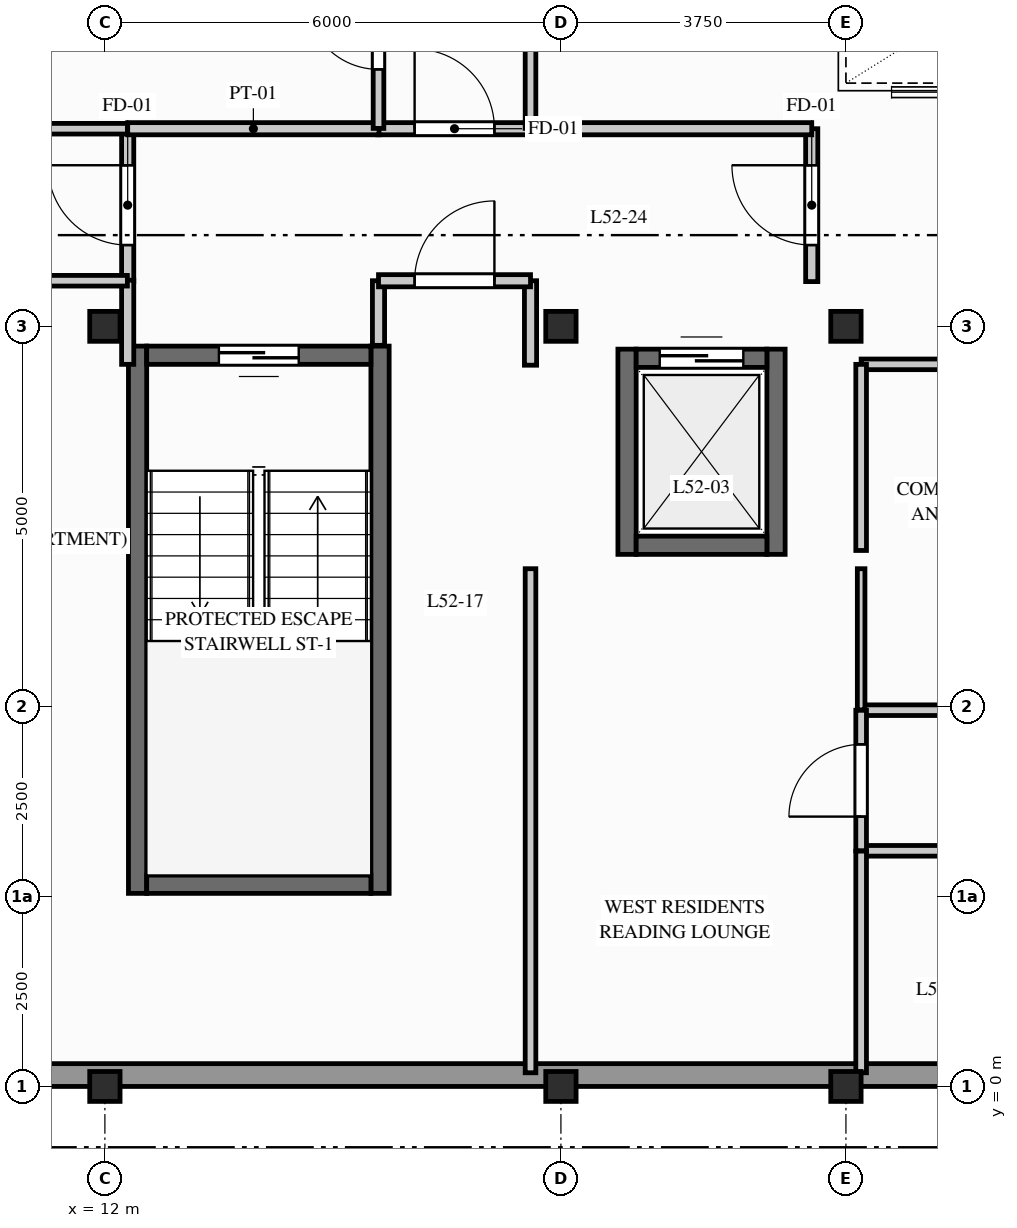
"""IFC4 building model, lengths in metres.
Left out: names, types, materials, properties, quantities, classifications, styles, units other than length and angle.
Written with IfcOpenShell. Run it as: python <this file> out.ifc"""

import sys

from ifc_helpers import new_model, si_unit, direction, frame, frame_2d, origin, origin_2d, place, context, subcontext, project, spatial, rectangle, i_section, extrude, element, fill, save


model = new_model("IFC4")
c1 = context("Model", 3, precision=1e-05, world=origin(), true_north=direction((0.0, 1.0)))
c2 = subcontext(c1, "Body", "Model", "MODEL_VIEW")
j1 = project(units=[si_unit("LENGTHUNIT", "METRE"), si_unit("PLANEANGLEUNIT", "RADIAN")], contexts=[c1])
p1 = place(None, origin())
s1 = spatial("IfcSite", under=j1, at=p1, CompositionType="ELEMENT")
p2 = place(p1, origin())
s2 = spatial("IfcBuilding", under=s1, at=p2, CompositionType="ELEMENT")
p3 = place(p2, frame((0.0, 0.0, 172.8)))
s3 = spatial("IfcBuildingStorey", under=s2, at=p3, CompositionType="ELEMENT", Elevation=172.8)
for number, where, z_axis, x_axis in (
    (1, (12.0, 0.0, 0.0), (0.0, 0.0, 1.0), (1.0, 0.0, 0.0)),
    (2, (12.0, 10.0, 0.0), (0.0, 0.0, 1.0), (1.0, 0.0, 0.0)),
    (3, (18.0, 0.0, 0.0), (0.0, 0.0, 1.0), (1.0, 0.0, 0.0)),
    (4, (18.0, 10.0, 0.0), (0.0, 0.0, 1.0), (1.0, 0.0, 0.0)),
    (5, (21.75, 0.0, 0.0), (0.0, 0.0, 1.0), (1.0, 0.0, 0.0)),
    (6, (21.75, 10.0, 0.0), (0.0, 0.0, 1.0), (1.0, 0.0, 0.0)),
):
    element("IfcColumn", number, at=place(p3, frame(where, z_axis=z_axis, x_axis=x_axis)), inside=s3, PredefinedType="COLUMN", context=c2, shape_type="SweptSolid", body=[
        extrude(i_section(OverallWidth=0.399, OverallDepth=0.394, WebThickness=0.023, FlangeThickness=0.037, FilletRadius=0.015, at=origin_2d()), origin(), (0.0, 0.0, 1.0), 3.1),
    ])
p4 = place(p3, frame((2.5, 0.15, 0.0), z_axis=(0.0, 0.0, 1.0), x_axis=(1.0, 0.0, 0.0)))
e7 = element("IfcWall", 7, at=p4, inside=s3, PredefinedType="STANDARD", context=c2, shape_type="SweptSolid", body=[
    extrude(rectangle(XDim=55.0, YDim=0.3, at=frame_2d((27.5, 0.0))), origin(), (0.0, 0.0, 1.0), 2.332),
])
p5 = place(p4, frame((1.0, 0.0, 0.312)))
e8 = element("IfcOpeningElement", 8, at=p5, cuts=e7, PredefinedType="OPENING", context=c2, shape_type="SweptSolid", body=[
    extrude(rectangle(XDim=1.5, YDim=1.8, at=frame_2d((0.75, 0.9))), frame((0.0, 0.16, 0.0), z_axis=(0.0, -1.0, 0.0), x_axis=(1.0, 0.0, 0.0)), (0.0, 0.0, 1.0), 0.32),
])
p6 = place(p4, frame((24.5, 0.0, 1.15)))
e9 = element("IfcOpeningElement", 9, at=p6, cuts=e7, PredefinedType="OPENING", context=c2, shape_type="SweptSolid", body=[
    extrude(rectangle(XDim=0.9, YDim=0.9, at=frame_2d((0.45, 0.45))), frame((0.0, 0.16, 0.0), z_axis=(0.0, -1.0, 0.0), x_axis=(1.0, 0.0, 0.0)), (0.0, 0.0, 1.0), 0.32),
])
p7 = place(p4, frame((47.2, 0.0, 0.512)))
e10 = element("IfcOpeningElement", 10, at=p7, cuts=e7, PredefinedType="OPENING", context=c2, shape_type="SweptSolid", body=[
    extrude(rectangle(XDim=1.2, YDim=1.6, at=frame_2d((0.6, 0.8))), frame((0.0, 0.16, 0.0), z_axis=(0.0, -1.0, 0.0), x_axis=(1.0, 0.0, 0.0)), (0.0, 0.0, 1.0), 0.32),
])
p8 = place(p4, frame((52.3, 0.0, 0.512)))
e11 = element("IfcOpeningElement", 11, at=p8, cuts=e7, PredefinedType="OPENING", context=c2, shape_type="SweptSolid", body=[
    extrude(rectangle(XDim=1.2, YDim=1.6, at=frame_2d((0.6, 0.8))), frame((0.0, 0.16, 0.0), z_axis=(0.0, -1.0, 0.0), x_axis=(1.0, 0.0, 0.0)), (0.0, 0.0, 1.0), 0.32),
])
p9 = place(p4, frame((4.988, 0.0, 0.512)))
e12 = element("IfcOpeningElement", 12, at=p9, cuts=e7, PredefinedType="OPENING", context=c2, shape_type="SweptSolid", body=[
    extrude(rectangle(XDim=1.2, YDim=1.6, at=frame_2d((0.6, 0.8))), frame((0.0, 0.16, 0.0), z_axis=(0.0, -1.0, 0.0), x_axis=(1.0, 0.0, 0.0)), (0.0, 0.0, 1.0), 0.32),
])
for number, where, z_axis, x_axis in (
    (13, (12.43, 2.54, 0.0), (0.0, 0.0, 1.0), (0.0, 1.0, 0.0)),
    (14, (15.62, 2.54, 0.0), (0.0, 0.0, 1.0), (0.0, 1.0, 0.0)),
):
    element("IfcWall", number, at=place(p3, frame(where, z_axis=z_axis, x_axis=x_axis)), inside=s3, PredefinedType="SHEAR", context=c2, shape_type="SweptSolid", body=[
        extrude(rectangle(XDim=7.2, YDim=0.24, at=frame_2d((3.6, 0.0))), origin(), (0.0, 0.0, 1.0), 2.89),
    ])
p10 = place(p3, frame((12.55, 2.66, 0.0), z_axis=(0.0, 0.0, 1.0), x_axis=(1.0, 0.0, 0.0)))
e15 = element("IfcWall", 15, at=p10, inside=s3, PredefinedType="SHEAR", context=c2, shape_type="SweptSolid", body=[
    extrude(rectangle(XDim=2.95, YDim=0.24, at=frame_2d((1.475, 0.0))), origin(), (0.0, 0.0, 1.0), 2.89),
])
p11 = place(p3, frame((15.5, 9.62, 0.0), z_axis=(0.0, 0.0, 1.0), x_axis=(-1.0, 0.0, 0.0)))
e16 = element("IfcWall", 16, at=p11, inside=s3, PredefinedType="SHEAR", context=c2, shape_type="SweptSolid", body=[
    extrude(rectangle(XDim=2.95, YDim=0.24, at=frame_2d((1.475, 0.0))), origin(), (0.0, 0.0, 1.0), 2.89),
])
p12 = place(p11, frame((0.95, 0.0, 0.0)))
e17 = element("IfcOpeningElement", 17, at=p12, cuts=e16, PredefinedType="OPENING", context=c2, shape_type="SweptSolid", body=[
    extrude(rectangle(XDim=1.05, YDim=2.06, at=frame_2d((0.525, 1.03))), frame((0.0, 0.13, 0.0), z_axis=(0.0, -1.0, 0.0), x_axis=(1.0, 0.0, 0.0)), (0.0, 0.0, 1.0), 0.26),
])
for number, where, z_axis, x_axis in (
    (18, (18.87, 7.0, 0.0), (0.0, 0.0, 1.0), (0.0, 1.0, 0.0)),
    (19, (20.83, 7.0, 0.0), (0.0, 0.0, 1.0), (0.0, 1.0, 0.0)),
):
    element("IfcWall", number, at=place(p3, frame(where, z_axis=z_axis, x_axis=x_axis)), inside=s3, PredefinedType="SHEAR", context=c2, shape_type="SweptSolid", body=[
        extrude(rectangle(XDim=2.7, YDim=0.24, at=frame_2d((1.35, 0.0))), origin(), (0.0, 0.0, 1.0), 2.89),
    ])
p13 = place(p3, frame((18.99, 7.12, 0.0), z_axis=(0.0, 0.0, 1.0), x_axis=(1.0, 0.0, 0.0)))
e20 = element("IfcWall", 20, at=p13, inside=s3, PredefinedType="SHEAR", context=c2, shape_type="SweptSolid", body=[
    extrude(rectangle(XDim=1.72, YDim=0.24, at=frame_2d((0.86, 0.0))), origin(), (0.0, 0.0, 1.0), 2.89),
])
p14 = place(p3, frame((18.99, 9.58, 0.0), z_axis=(0.0, 0.0, 1.0), x_axis=(1.0, 0.0, 0.0)))
e21 = element("IfcWall", 21, at=p14, inside=s3, PredefinedType="SHEAR", context=c2, shape_type="SweptSolid", body=[
    extrude(rectangle(XDim=1.72, YDim=0.24, at=frame_2d((0.86, 0.0))), origin(), (0.0, 0.0, 1.0), 2.89),
])
p15 = place(p14, frame((0.31, 0.0, 0.0)))
e22 = element("IfcOpeningElement", 22, at=p15, cuts=e21, PredefinedType="OPENING", context=c2, shape_type="SweptSolid", body=[
    extrude(rectangle(XDim=1.1, YDim=2.06, at=frame_2d((0.55, 1.03))), frame((0.0, 0.13, 0.0), z_axis=(0.0, -1.0, 0.0), x_axis=(1.0, 0.0, 0.0)), (0.0, 0.0, 1.0), 0.26),
])
p16 = place(p3, frame((21.95, 3.1, 0.0), z_axis=(0.0, 0.0, 1.0), x_axis=(1.0, 0.0, 0.0)))
e23 = element("IfcWall", 23, at=p16, inside=s3, PredefinedType="PARTITIONING", context=c2, shape_type="SweptSolid", body=[
    extrude(rectangle(XDim=3.781, YDim=0.14, at=frame_2d((1.891, 0.0))), origin(), (0.0, 0.0, 1.0), 2.89),
])
p17 = place(p16, frame((1.366, 0.0, 0.0)))
e24 = element("IfcOpeningElement", 24, at=p17, cuts=e23, PredefinedType="OPENING", context=c2, shape_type="SweptSolid", body=[
    extrude(rectangle(XDim=1.05, YDim=2.06, at=frame_2d((0.525, 1.03))), frame((0.0, 0.08, 0.0), z_axis=(0.0, -1.0, 0.0), x_axis=(1.0, 0.0, 0.0)), (0.0, 0.0, 1.0), 0.16),
])
p18 = place(p3, frame((21.95, 4.95, 0.0), z_axis=(0.0, 0.0, 1.0), x_axis=(1.0, 0.0, 0.0)))
e25 = element("IfcWall", 25, at=p18, inside=s3, PredefinedType="PARTITIONING", context=c2, shape_type="SweptSolid", body=[
    extrude(rectangle(XDim=5.231, YDim=0.14, at=frame_2d((2.616, 0.0))), origin(), (0.0, 0.0, 1.0), 2.89),
])
p19 = place(p18, frame((2.141, 0.0, 0.0)))
e26 = element("IfcOpeningElement", 26, at=p19, cuts=e25, PredefinedType="OPENING", context=c2, shape_type="SweptSolid", body=[
    extrude(rectangle(XDim=0.95, YDim=2.05, at=frame_2d((0.475, 1.025))), frame((0.0, 0.08, 0.0), z_axis=(0.0, -1.0, 0.0), x_axis=(1.0, 0.0, 0.0)), (0.0, 0.0, 1.0), 0.16),
])
p20 = place(p3, frame((21.95, 3.1, 0.0), z_axis=(0.0, 0.0, 1.0), x_axis=(0.0, 1.0, 0.0)))
e27 = element("IfcWall", 27, at=p20, inside=s3, PredefinedType="PARTITIONING", context=c2, shape_type="SweptSolid", body=[
    extrude(rectangle(XDim=1.85, YDim=0.14, at=frame_2d((0.925, 0.0))), origin(), (0.0, 0.0, 1.0), 2.253),
])
p21 = place(p20, frame((0.45, 0.0, 0.0)))
e28 = element("IfcOpeningElement", 28, at=p21, cuts=e27, PredefinedType="OPENING", context=c2, shape_type="SweptSolid", body=[
    extrude(rectangle(XDim=0.95, YDim=2.05, at=frame_2d((0.475, 1.025))), frame((0.0, 0.08, 0.0), z_axis=(0.0, -1.0, 0.0), x_axis=(1.0, 0.0, 0.0)), (0.0, 0.0, 1.0), 0.16),
])
p22 = place(p3, frame((21.95, 0.18, 0.0), z_axis=(0.0, 0.0, 1.0), x_axis=(0.0, 1.0, 0.0)))
e29 = element("IfcWall", 29, at=p22, inside=s3, PredefinedType="PARTITIONING", context=c2, shape_type="SweptSolid", body=[
    extrude(rectangle(XDim=2.916, YDim=0.14, at=frame_2d((1.458, 0.0))), origin(), (0.0, 0.0, 1.0), 2.253),
])
p23 = place(p3, frame((21.95, 4.954, 0.0), z_axis=(0.0, 0.0, 1.0), x_axis=(0.0, 1.0, 0.0)))
e30 = element("IfcWall", 30, at=p23, inside=s3, PredefinedType="PARTITIONING", context=c2, shape_type="SweptSolid", body=[
    extrude(rectangle(XDim=1.857, YDim=0.1, at=frame_2d((0.929, 0.0))), origin(), (0.0, 0.0, 1.0), 2.253),
])
p24 = place(p3, frame((17.6, 0.18, 0.0), z_axis=(0.0, 0.0, 1.0), x_axis=(0.0, 1.0, 0.0)))
e31 = element("IfcWall", 31, at=p24, inside=s3, PredefinedType="PARTITIONING", context=c2, shape_type="SweptSolid", body=[
    extrude(rectangle(XDim=6.631, YDim=0.14, at=frame_2d((3.316, 0.0))), origin(), (0.0, 0.0, 1.0), 2.89),
])
p25 = place(p3, frame((15.6, 9.75, 0.0), z_axis=(0.0, 0.0, 1.0), x_axis=(0.0, 1.0, 0.0)))
e32 = element("IfcWall", 32, at=p25, inside=s3, PredefinedType="PARTITIONING", context=c2, shape_type="SweptSolid", body=[
    extrude(rectangle(XDim=0.85, YDim=0.16, at=frame_2d((0.425, 0.0))), origin(), (0.0, 0.0, 1.0), 2.253),
])
p26 = place(p3, frame((17.6, 9.489, 0.0), z_axis=(0.0, 0.0, 1.0), x_axis=(0.0, 1.0, 0.0)))
e33 = element("IfcWall", 33, at=p26, inside=s3, PredefinedType="PARTITIONING", context=c2, shape_type="SweptSolid", body=[
    extrude(rectangle(XDim=1.111, YDim=0.16, at=frame_2d((0.556, 0.0))), origin(), (0.0, 0.0, 1.0), 2.253),
])
p27 = place(p3, frame((15.6, 10.6, 0.0), z_axis=(0.0, 0.0, 1.0), x_axis=(1.0, 0.0, 0.0)))
e34 = element("IfcWall", 34, at=p27, inside=s3, PredefinedType="PARTITIONING", context=c2, shape_type="SweptSolid", body=[
    extrude(rectangle(XDim=2.0, YDim=0.16, at=frame_2d((1.0, 0.0))), origin(), (0.0, 0.0, 1.0), 2.89),
])
p28 = place(p27, frame((0.475, 0.0, 0.0)))
e35 = element("IfcOpeningElement", 35, at=p28, cuts=e34, PredefinedType="OPENING", context=c2, shape_type="SweptSolid", body=[
    extrude(rectangle(XDim=1.05, YDim=2.06, at=frame_2d((0.525, 1.03))), frame((0.0, 0.09, 0.0), z_axis=(0.0, -1.0, 0.0), x_axis=(1.0, 0.0, 0.0)), (0.0, 0.0, 1.0), 0.18),
])
p29 = place(p3, frame((21.3, 10.589, 0.0), z_axis=(0.0, 0.0, 1.0), x_axis=(0.0, 1.0, 0.0)))
e36 = element("IfcWall", 36, at=p29, inside=s3, PredefinedType="PARTITIONING", context=c2, shape_type="SweptSolid", body=[
    extrude(rectangle(XDim=2.011, YDim=0.16, at=frame_2d((1.006, 0.0))), origin(), (0.0, 0.0, 1.0), 2.89),
])
p30 = place(p29, frame((0.481, 0.0, 0.0)))
e37 = element("IfcOpeningElement", 37, at=p30, cuts=e36, PredefinedType="OPENING", context=c2, shape_type="SweptSolid", body=[
    extrude(rectangle(XDim=1.05, YDim=2.06, at=frame_2d((0.525, 1.03))), frame((0.0, 0.09, 0.0), z_axis=(0.0, -1.0, 0.0), x_axis=(1.0, 0.0, 0.0)), (0.0, 0.0, 1.0), 0.18),
])
p31 = place(p3, frame((15.589, 12.6, 0.0), z_axis=(0.0, 0.0, 1.0), x_axis=(1.0, 0.0, 0.0)))
e38 = element("IfcWall", 38, at=p31, inside=s3, PredefinedType="PARTITIONING", context=c2, shape_type="SweptSolid", body=[
    extrude(rectangle(XDim=2.023, YDim=0.16, at=frame_2d((1.011, 0.0))), origin(), (0.0, 0.0, 1.0), 2.89),
])
p32 = place(p31, frame((0.486, 0.0, 0.0)))
e39 = element("IfcOpeningElement", 39, at=p32, cuts=e38, PredefinedType="OPENING", context=c2, shape_type="SweptSolid", body=[
    extrude(rectangle(XDim=1.05, YDim=2.06, at=frame_2d((0.525, 1.03))), frame((0.0, 0.09, 0.0), z_axis=(0.0, -1.0, 0.0), x_axis=(1.0, 0.0, 0.0)), (0.0, 0.0, 1.0), 0.18),
])
p33 = place(p3, frame((12.3, 10.589, 0.0), z_axis=(0.0, 0.0, 1.0), x_axis=(0.0, 1.0, 0.0)))
e40 = element("IfcWall", 40, at=p33, inside=s3, PredefinedType="PARTITIONING", context=c2, shape_type="SweptSolid", body=[
    extrude(rectangle(XDim=2.011, YDim=0.16, at=frame_2d((1.006, 0.0))), origin(), (0.0, 0.0, 1.0), 2.89),
])
p34 = place(p33, frame((0.481, 0.0, 0.0)))
e41 = element("IfcOpeningElement", 41, at=p34, cuts=e40, PredefinedType="OPENING", context=c2, shape_type="SweptSolid", body=[
    extrude(rectangle(XDim=1.05, YDim=2.06, at=frame_2d((0.525, 1.03))), frame((0.0, 0.09, 0.0), z_axis=(0.0, -1.0, 0.0), x_axis=(1.0, 0.0, 0.0)), (0.0, 0.0, 1.0), 0.18),
])
p35 = place(p3, frame((12.3, 9.5, 0.0), z_axis=(0.0, 0.0, 1.0), x_axis=(0.0, 1.0, 0.0)))
e42 = element("IfcWall", 42, at=p35, inside=s3, PredefinedType="PARTITIONING", context=c2, shape_type="SweptSolid", body=[
    extrude(rectangle(XDim=1.107, YDim=0.16, at=frame_2d((0.554, 0.0))), origin(), (0.0, 0.0, 1.0), 2.253),
])
p36 = place(p3, frame((12.3, 12.6, 0.0), z_axis=(0.0, 0.0, 1.0), x_axis=(1.0, 0.0, 0.0)))
e43 = element("IfcWall", 43, at=p36, inside=s3, PredefinedType="PARTITIONING", context=c2, shape_type="SweptSolid", body=[
    extrude(rectangle(XDim=3.307, YDim=0.16, at=frame_2d((1.654, 0.0))), origin(), (0.0, 0.0, 1.0), 2.89),
])
p37 = place(p3, frame((17.593, 12.6, 0.0), z_axis=(0.0, 0.0, 1.0), x_axis=(1.0, 0.0, 0.0)))
e44 = element("IfcWall", 44, at=p37, inside=s3, PredefinedType="PARTITIONING", context=c2, shape_type="SweptSolid", body=[
    extrude(rectangle(XDim=3.707, YDim=0.16, at=frame_2d((1.854, 0.0))), origin(), (0.0, 0.0, 1.0), 2.253),
])
p38 = place(p3, frame((15.6, 12.604, 0.0), z_axis=(0.0, 0.0, 1.0), x_axis=(0.0, 1.0, 0.0)))
e45 = element("IfcWall", 45, at=p38, inside=s3, PredefinedType="PARTITIONING", context=c2, shape_type="SweptSolid", body=[
    extrude(rectangle(XDim=2.503, YDim=0.14, at=frame_2d((1.252, 0.0))), origin(), (0.0, 0.0, 1.0), 2.89),
])
p39 = place(p38, frame((0.777, 0.0, 0.0)))
e46 = element("IfcOpeningElement", 46, at=p39, cuts=e45, PredefinedType="OPENING", context=c2, shape_type="SweptSolid", body=[
    extrude(rectangle(XDim=0.95, YDim=2.05, at=frame_2d((0.475, 1.025))), frame((0.0, 0.08, 0.0), z_axis=(0.0, -1.0, 0.0), x_axis=(1.0, 0.0, 0.0)), (0.0, 0.0, 1.0), 0.16),
])
p40 = place(p3, frame((17.6, 12.604, 0.0), z_axis=(0.0, 0.0, 1.0), x_axis=(0.0, 1.0, 0.0)))
e47 = element("IfcWall", 47, at=p40, inside=s3, PredefinedType="PARTITIONING", context=c2, shape_type="SweptSolid", body=[
    extrude(rectangle(XDim=10.896, YDim=0.14, at=frame_2d((5.448, 0.0))), origin(), (0.0, 0.0, 1.0), 2.253),
])
p41 = place(p40, frame((4.973, 0.0, 0.0)))
e48 = element("IfcOpeningElement", 48, at=p41, cuts=e47, PredefinedType="OPENING", context=c2, shape_type="SweptSolid", body=[
    extrude(rectangle(XDim=0.95, YDim=2.05, at=frame_2d((0.475, 1.025))), frame((0.0, 0.08, 0.0), z_axis=(0.0, -1.0, 0.0), x_axis=(1.0, 0.0, 0.0)), (0.0, 0.0, 1.0), 0.16),
])
p42 = place(p3, frame((6.443, 10.6, 0.0), z_axis=(0.0, 0.0, 1.0), x_axis=(1.0, 0.0, 0.0)))
e49 = element("IfcWall", 49, at=p42, inside=s3, PredefinedType="PARTITIONING", context=c2, shape_type="SweptSolid", body=[
    extrude(rectangle(XDim=5.853, YDim=0.14, at=frame_2d((2.927, 0.0))), origin(), (0.0, 0.0, 1.0), 2.253),
])
p43 = place(p42, frame((2.452, 0.0, 0.0)))
e50 = element("IfcOpeningElement", 50, at=p43, cuts=e49, PredefinedType="OPENING", context=c2, shape_type="SweptSolid", body=[
    extrude(rectangle(XDim=0.95, YDim=2.05, at=frame_2d((0.475, 1.025))), frame((0.0, 0.08, 0.0), z_axis=(0.0, -1.0, 0.0), x_axis=(1.0, 0.0, 0.0)), (0.0, 0.0, 1.0), 0.16),
])
p44 = place(p3, frame((4.793, 12.6, 0.0), z_axis=(0.0, 0.0, 1.0), x_axis=(1.0, 0.0, 0.0)))
e51 = element("IfcWall", 51, at=p44, inside=s3, PredefinedType="PARTITIONING", context=c2, shape_type="SweptSolid", body=[
    extrude(rectangle(XDim=7.503, YDim=0.14, at=frame_2d((3.751, 0.0))), origin(), (0.0, 0.0, 1.0), 2.253),
])
p45 = place(p3, frame((21.95, 9.5, 0.0), z_axis=(0.0, 0.0, 1.0), x_axis=(1.0, 0.0, 0.0)))
e52 = element("IfcWall", 52, at=p45, inside=s3, PredefinedType="PARTITIONING", context=c2, shape_type="SweptSolid", body=[
    extrude(rectangle(XDim=4.98, YDim=0.14, at=frame_2d((2.49, 0.0))), origin(), (0.0, 0.0, 1.0), 2.89),
])
p46 = place(p3, frame((21.95, 7.051, 0.0), z_axis=(0.0, 0.0, 1.0), x_axis=(0.0, 1.0, 0.0)))
e53 = element("IfcWall", 53, at=p46, inside=s3, PredefinedType="PARTITIONING", context=c2, shape_type="SweptSolid", body=[
    extrude(rectangle(XDim=2.449, YDim=0.14, at=frame_2d((1.224, 0.0))), origin(), (0.0, 0.0, 1.0), 2.253),
])
p47 = place(p12, origin())
e54 = element("IfcDoor", 54, at=p47, inside=s3, OperationType="SINGLE_SWING_RIGHT", PredefinedType="DOOR", context=c2, shape_type="SweptSolid", body=[
    extrude(rectangle(XDim=1.05, YDim=2.06, at=frame_2d((0.525, 1.03))), frame((0.0, 0.025, 0.0), z_axis=(0.0, -1.0, 0.0), x_axis=(1.0, 0.0, 0.0)), (0.0, 0.0, 1.0), 0.05),
])
fill(e17, e54)
p48 = place(p15, origin())
e55 = element("IfcDoor", 55, at=p48, inside=s3, OperationType="SLIDING_TO_RIGHT", PredefinedType="DOOR", context=c2, shape_type="SweptSolid", body=[
    extrude(rectangle(XDim=1.1, YDim=2.06, at=frame_2d((0.55, 1.03))), frame((0.0, 0.025, 0.0), z_axis=(0.0, -1.0, 0.0), x_axis=(1.0, 0.0, 0.0)), (0.0, 0.0, 1.0), 0.05),
])
fill(e22, e55)
p49 = place(p21, origin())
e56 = element("IfcDoor", 56, at=p49, inside=s3, OperationType="SINGLE_SWING_LEFT", PredefinedType="DOOR", context=c2, shape_type="SweptSolid", body=[
    extrude(rectangle(XDim=0.95, YDim=2.05, at=frame_2d((0.475, 1.025))), frame((0.0, 0.025, 0.0), z_axis=(0.0, -1.0, 0.0), x_axis=(1.0, 0.0, 0.0)), (0.0, 0.0, 1.0), 0.05),
])
fill(e28, e56)
p50 = place(p28, origin())
e57 = element("IfcDoor", 57, at=p50, inside=s3, OperationType="SINGLE_SWING_RIGHT", PredefinedType="DOOR", context=c2, shape_type="SweptSolid", body=[
    extrude(rectangle(XDim=1.05, YDim=2.06, at=frame_2d((0.525, 1.03))), frame((0.0, 0.025, 0.0), z_axis=(0.0, -1.0, 0.0), x_axis=(1.0, 0.0, 0.0)), (0.0, 0.0, 1.0), 0.05),
])
fill(e35, e57)
p51 = place(p30, origin())
e58 = element("IfcDoor", 58, at=p51, inside=s3, OperationType="SINGLE_SWING_RIGHT", PredefinedType="DOOR", context=c2, shape_type="SweptSolid", body=[
    extrude(rectangle(XDim=1.05, YDim=2.06, at=frame_2d((0.525, 1.03))), frame((0.0, 0.025, 0.0), z_axis=(0.0, -1.0, 0.0), x_axis=(1.0, 0.0, 0.0)), (0.0, 0.0, 1.0), 0.05),
])
fill(e37, e58)
p52 = place(p32, origin())
e59 = element("IfcDoor", 59, at=p52, inside=s3, OperationType="SINGLE_SWING_LEFT", PredefinedType="DOOR", context=c2, shape_type="SweptSolid", body=[
    extrude(rectangle(XDim=1.05, YDim=2.06, at=frame_2d((0.525, 1.03))), frame((0.0, 0.025, 0.0), z_axis=(0.0, -1.0, 0.0), x_axis=(1.0, 0.0, 0.0)), (0.0, 0.0, 1.0), 0.05),
])
fill(e39, e59)
p53 = place(p34, origin())
e60 = element("IfcDoor", 60, at=p53, inside=s3, OperationType="SINGLE_SWING_RIGHT", PredefinedType="DOOR", context=c2, shape_type="SweptSolid", body=[
    extrude(rectangle(XDim=1.05, YDim=2.06, at=frame_2d((0.525, 1.03))), frame((0.0, 0.025, 0.0), z_axis=(0.0, -1.0, 0.0), x_axis=(1.0, 0.0, 0.0)), (0.0, 0.0, 1.0), 0.05),
])
fill(e41, e60)
p54 = place(p39, origin())
e61 = element("IfcDoor", 61, at=p54, inside=s3, OperationType="SINGLE_SWING_RIGHT", PredefinedType="DOOR", context=c2, shape_type="SweptSolid", body=[
    extrude(rectangle(XDim=0.95, YDim=2.05, at=frame_2d((0.475, 1.025))), frame((0.0, 0.025, 0.0), z_axis=(0.0, -1.0, 0.0), x_axis=(1.0, 0.0, 0.0)), (0.0, 0.0, 1.0), 0.05),
])
fill(e46, e61)
save(model, sys.argv[1])
